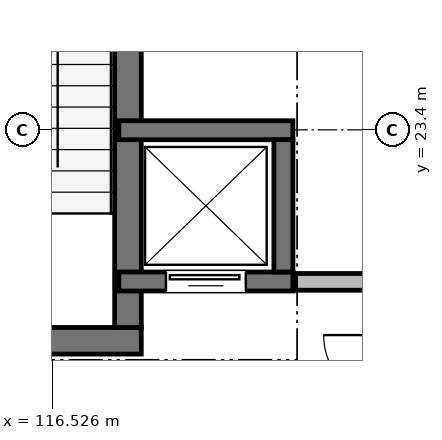
"""IFC4 building model, lengths in metres.
Left out: names, types, materials, properties, quantities, classifications, styles, units other than length and angle.
Written with IfcOpenShell. Run it as: python <this file> out.ifc"""

import sys

from ifc_helpers import new_model, si_unit, direction, frame, frame_2d, origin, place, context, subcontext, project, spatial, rectangle, extrude, element, fill, save


model = new_model("IFC4")
c1 = context("Model", 3, precision=1e-05, world=origin(), true_north=direction((0.0, 1.0)))
c2 = subcontext(c1, "Body", "Model", "MODEL_VIEW")
j1 = project(units=[si_unit("LENGTHUNIT", "METRE"), si_unit("PLANEANGLEUNIT", "RADIAN")], contexts=[c1])
p1 = place(None, origin())
s1 = spatial("IfcSite", under=j1, at=p1, CompositionType="ELEMENT")
p2 = place(p1, origin())
s2 = spatial("IfcBuilding", under=s1, at=p2, CompositionType="ELEMENT")
p3 = place(p2, frame((0.0, 0.0, -4.5)))
s3 = spatial("IfcBuildingStorey", under=s2, at=p3, CompositionType="ELEMENT", Elevation=-4.5)
p4 = place(p3, frame((113.85, 20.625, 0.0), z_axis=(0.0, 0.0, 1.0), x_axis=(1.0, 0.0, 0.0)))
e1 = element("IfcWall", 1, at=p4, inside=s3, PredefinedType="SHEAR", context=c2, shape_type="SweptSolid", body=[
    extrude(rectangle(XDim=3.85, YDim=0.35, at=frame_2d((1.925, 0.0))), origin(), (0.0, 0.0, 1.0), 4.28),
])
p5 = place(p4, frame((0.45, 0.0, 0.0)))
e2 = element("IfcOpeningElement", 2, at=p5, cuts=e1, PredefinedType="OPENING", context=c2, shape_type="SweptSolid", body=[
    extrude(rectangle(XDim=1.5, YDim=2.2, at=frame_2d((0.75, 1.1))), frame((0.0, 0.185, 0.0), z_axis=(0.0, -1.0, 0.0), x_axis=(1.0, 0.0, 0.0)), (0.0, 0.0, 1.0), 0.37),
])
p6 = place(p3, frame((117.525, 20.8, 0.0), z_axis=(0.0, 0.0, 1.0), x_axis=(0.0, 1.0, 0.0)))
e3 = element("IfcWall", 3, at=p6, inside=s3, PredefinedType="SHEAR", context=c2, shape_type="SweptSolid", body=[
    extrude(rectangle(XDim=7.05, YDim=0.35, at=frame_2d((3.525, 0.0))), origin(), (0.0, 0.0, 1.0), 4.28),
])
p7 = place(p3, frame((117.405, 21.405, 0.0), z_axis=(0.0, 0.0, 1.0), x_axis=(1.0, 0.0, 0.0)))
e4 = element("IfcWall", 4, at=p7, inside=s3, PredefinedType="SHEAR", context=c2, shape_type="SweptSolid", body=[
    extrude(rectangle(XDim=2.29, YDim=0.25, at=frame_2d((1.145, 0.0))), origin(), (0.0, 0.0, 1.0), 4.26),
])
p8 = place(p7, frame((0.62, 0.0, 0.0)))
e5 = element("IfcOpeningElement", 5, at=p8, cuts=e4, PredefinedType="OPENING", context=c2, shape_type="SweptSolid", body=[
    extrude(rectangle(XDim=1.05, YDim=2.15, at=frame_2d((0.525, 1.075))), frame((0.0, 0.135, 0.0), z_axis=(0.0, -1.0, 0.0), x_axis=(1.0, 0.0, 0.0)), (0.0, 0.0, 1.0), 0.27),
])
p9 = place(p3, frame((117.405, 23.395, 0.0), z_axis=(0.0, 0.0, 1.0), x_axis=(1.0, 0.0, 0.0)))
e6 = element("IfcWall", 6, at=p9, inside=s3, PredefinedType="SHEAR", context=c2, shape_type="SweptSolid", body=[
    extrude(rectangle(XDim=2.29, YDim=0.25, at=frame_2d((1.145, 0.0))), origin(), (0.0, 0.0, 1.0), 4.26),
])
p10 = place(p3, frame((119.57, 21.53, 0.0), z_axis=(0.0, 0.0, 1.0), x_axis=(0.0, 1.0, 0.0)))
e7 = element("IfcWall", 7, at=p10, inside=s3, PredefinedType="SHEAR", context=c2, shape_type="SweptSolid", body=[
    extrude(rectangle(XDim=1.74, YDim=0.25, at=frame_2d((0.87, 0.0))), origin(), (0.0, 0.0, 1.0), 4.26),
])
p11 = place(p3, frame((119.73, 21.4, 0.0), z_axis=(0.0, 0.0, 1.0), x_axis=(1.0, 0.0, 0.0)))
e8 = element("IfcWall", 8, at=p11, inside=s3, PredefinedType="PARTITIONING", context=c2, shape_type="SweptSolid", body=[
    extrude(rectangle(XDim=1.24, YDim=0.22, at=frame_2d((0.62, 0.0))), origin(), (0.0, 0.0, 1.0), 4.18),
])
p12 = place(p8, frame((1.05, 0.0, 0.0), z_axis=(0.0, 0.0, 1.0), x_axis=(-1.0, 0.0, 0.0)))
e9 = element("IfcDoor", 9, at=p12, inside=s3, OperationType="SLIDING_TO_RIGHT", PredefinedType="DOOR", context=c2, shape_type="SweptSolid", body=[
    extrude(rectangle(XDim=1.05, YDim=2.15, at=frame_2d((0.525, 1.075))), frame((0.0, 0.025, 0.0), z_axis=(0.0, -1.0, 0.0), x_axis=(1.0, 0.0, 0.0)), (0.0, 0.0, 1.0), 0.05),
])
fill(e5, e9)
save(model, sys.argv[1])
